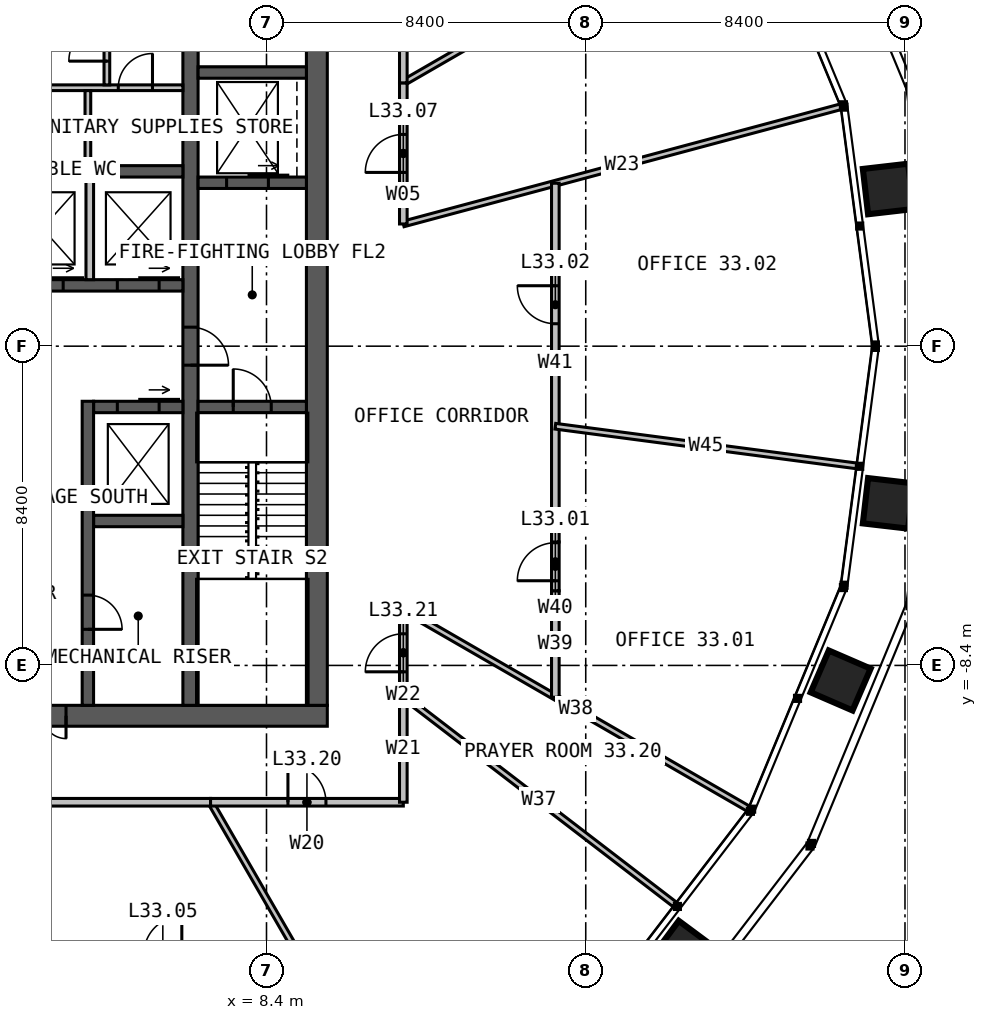
"""IFC4 building model, lengths in metres.
Left out: names, types, materials, properties, quantities, classifications, styles, units other than length and angle.
Written with IfcOpenShell. Run it as: python <this file> out.ifc"""

import sys

from ifc_helpers import new_model, si_unit, direction, frame, frame_2d, origin, place, context, subcontext, project, spatial, rectangle, extrude, element, fill, save


model = new_model("IFC4")
c1 = context("Model", 3, precision=1e-05, world=origin(), true_north=direction((0.0, 1.0)))
c2 = subcontext(c1, "Body", "Model", "MODEL_VIEW")
j1 = project(units=[si_unit("LENGTHUNIT", "METRE"), si_unit("PLANEANGLEUNIT", "RADIAN")], contexts=[c1])
p1 = place(None, origin())
s1 = spatial("IfcSite", under=j1, at=p1, CompositionType="ELEMENT")
p2 = place(p1, origin())
s2 = spatial("IfcBuilding", under=s1, at=p2, CompositionType="ELEMENT")
p3 = place(p2, frame((0.0, 0.0, 138.0)))
s3 = spatial("IfcBuildingStorey", under=s2, at=p3, CompositionType="ELEMENT", Elevation=138.0)
p4 = place(p3, frame((10.0, -9.725, 0.0), z_axis=(0.0, 0.0, 1.0), x_axis=(-1.0, 0.0, 0.0)))
e1 = element("IfcWall", 1, at=p4, inside=s3, PredefinedType="SOLIDWALL", context=c2, shape_type="SweptSolid", body=[
    extrude(rectangle(XDim=20.0, YDim=0.55, at=frame_2d((10.0, 0.0))), origin(), (0.0, 0.0, 1.0), 4.0),
])
p5 = place(p4, frame((6.875, 0.0, 0.0)))
e2 = element("IfcOpeningElement", 2, at=p5, cuts=e1, PredefinedType="OPENING", context=c2, shape_type="SweptSolid", body=[
    extrude(rectangle(XDim=1.2, YDim=2.2, at=frame_2d((0.6, 1.1))), frame((0.0, 0.285, 0.0), z_axis=(0.0, -1.0, 0.0), x_axis=(1.0, 0.0, 0.0)), (0.0, 0.0, 1.0), 0.57),
])
p6 = place(p3, frame((9.725, -9.45, 0.0), z_axis=(0.0, 0.0, 1.0), x_axis=(0.0, 1.0, 0.0)))
e3 = element("IfcWall", 3, at=p6, inside=s3, PredefinedType="SOLIDWALL", context=c2, shape_type="SweptSolid", body=[
    extrude(rectangle(XDim=18.9, YDim=0.55, at=frame_2d((9.45, 0.0))), origin(), (0.0, 0.0, 1.0), 4.0),
])
p7 = place(p3, frame((6.4, 9.45, 0.0), z_axis=(0.0, 0.0, 1.0), x_axis=(0.0, -1.0, 0.0)))
e4 = element("IfcWall", 4, at=p7, inside=s3, PredefinedType="SOLIDWALL", context=c2, shape_type="SweptSolid", body=[
    extrude(rectangle(XDim=18.9, YDim=0.4, at=frame_2d((9.45, 0.0))), origin(), (0.0, 0.0, 1.0), 4.0),
])
p8 = place(p7, frame((8.95, 0.0, 0.0)))
e5 = element("IfcOpeningElement", 5, at=p8, cuts=e4, PredefinedType="OPENING", context=c2, shape_type="SweptSolid", body=[
    extrude(rectangle(XDim=1.0, YDim=2.2, at=frame_2d((0.5, 1.1))), frame((0.0, 0.21, 0.0), z_axis=(0.0, -1.0, 0.0), x_axis=(1.0, 0.0, 0.0)), (0.0, 0.0, 1.0), 0.42),
])
p9 = place(p3, frame((1.35, 1.6, 0.0), z_axis=(0.0, 0.0, 1.0), x_axis=(1.0, 0.0, 0.0)))
e6 = element("IfcWall", 6, at=p9, inside=s3, PredefinedType="SOLIDWALL", context=c2, shape_type="SweptSolid", body=[
    extrude(rectangle(XDim=4.85, YDim=0.3, at=frame_2d((2.425, 0.0))), origin(), (0.0, 0.0, 1.0), 4.0),
])
p10 = place(p9, frame((0.6, 0.0, 0.0)))
e7 = element("IfcOpeningElement", 7, at=p10, cuts=e6, PredefinedType="OPENING", context=c2, shape_type="SweptSolid", body=[
    extrude(rectangle(XDim=1.1, YDim=2.2, at=frame_2d((0.55, 1.1))), frame((0.0, 0.16, 0.0), z_axis=(0.0, -1.0, 0.0), x_axis=(1.0, 0.0, 0.0)), (0.0, 0.0, 1.0), 0.32),
])
p11 = place(p9, frame((3.125, 0.0, 0.0)))
e8 = element("IfcOpeningElement", 8, at=p11, cuts=e6, PredefinedType="OPENING", context=c2, shape_type="SweptSolid", body=[
    extrude(rectangle(XDim=1.1, YDim=2.2, at=frame_2d((0.55, 1.1))), frame((0.0, 0.16, 0.0), z_axis=(0.0, -1.0, 0.0), x_axis=(1.0, 0.0, 0.0)), (0.0, 0.0, 1.0), 0.32),
])
p12 = place(p3, frame((1.35, 4.6, 0.0), z_axis=(0.0, 0.0, 1.0), x_axis=(1.0, 0.0, 0.0)))
e9 = element("IfcWall", 9, at=p12, inside=s3, PredefinedType="SOLIDWALL", context=c2, shape_type="SweptSolid", body=[
    extrude(rectangle(XDim=4.85, YDim=0.3, at=frame_2d((2.425, 0.0))), origin(), (0.0, 0.0, 1.0), 4.0),
])
p13 = place(p3, frame((3.85, -1.6, 0.0), z_axis=(0.0, 0.0, 1.0), x_axis=(1.0, 0.0, 0.0)))
e10 = element("IfcWall", 10, at=p13, inside=s3, PredefinedType="SOLIDWALL", context=c2, shape_type="SweptSolid", body=[
    extrude(rectangle(XDim=2.35, YDim=0.3, at=frame_2d((1.175, 0.0))), origin(), (0.0, 0.0, 1.0), 4.0),
])
p14 = place(p13, frame((0.625, 0.0, 0.0)))
e11 = element("IfcOpeningElement", 11, at=p14, cuts=e10, PredefinedType="OPENING", context=c2, shape_type="SweptSolid", body=[
    extrude(rectangle(XDim=1.1, YDim=2.2, at=frame_2d((0.55, 1.1))), frame((0.0, 0.16, 0.0), z_axis=(0.0, -1.0, 0.0), x_axis=(1.0, 0.0, 0.0)), (0.0, 0.0, 1.0), 0.32),
])
p15 = place(p3, frame((3.85, -4.6, 0.0), z_axis=(0.0, 0.0, 1.0), x_axis=(1.0, 0.0, 0.0)))
e12 = element("IfcWall", 12, at=p15, inside=s3, PredefinedType="SOLIDWALL", context=c2, shape_type="SweptSolid", body=[
    extrude(rectangle(XDim=2.35, YDim=0.3, at=frame_2d((1.175, 0.0))), origin(), (0.0, 0.0, 1.0), 4.0),
])
p16 = place(p3, frame((3.7, -1.45, 0.0), z_axis=(0.0, 0.0, 1.0), x_axis=(0.0, -1.0, 0.0)))
e13 = element("IfcWall", 13, at=p16, inside=s3, PredefinedType="SOLIDWALL", context=c2, shape_type="SweptSolid", body=[
    extrude(rectangle(XDim=8.0, YDim=0.3, at=frame_2d((4.0, 0.0))), origin(), (0.0, 0.0, 1.0), 4.0),
])
p17 = place(p16, frame((5.1, 0.0, 0.0)))
e14 = element("IfcOpeningElement", 14, at=p17, cuts=e13, PredefinedType="OPENING", context=c2, shape_type="SweptSolid", body=[
    extrude(rectangle(XDim=0.9, YDim=2.2, at=frame_2d((0.45, 1.1))), frame((0.0, 0.16, 0.0), z_axis=(0.0, -1.0, 0.0), x_axis=(1.0, 0.0, 0.0)), (0.0, 0.0, 1.0), 0.32),
])
p18 = place(p3, frame((6.6, -1.6, 0.0), z_axis=(0.0, 0.0, 1.0), x_axis=(1.0, 0.0, 0.0)))
e15 = element("IfcWall", 15, at=p18, inside=s3, PredefinedType="SOLIDWALL", context=c2, shape_type="SweptSolid", body=[
    extrude(rectangle(XDim=2.85, YDim=0.3, at=frame_2d((1.425, 0.0))), origin(), (0.0, 0.0, 1.0), 4.0),
])
p19 = place(p18, frame((0.925, 0.0, 0.0)))
e16 = element("IfcOpeningElement", 16, at=p19, cuts=e15, PredefinedType="OPENING", context=c2, shape_type="SweptSolid", body=[
    extrude(rectangle(XDim=1.0, YDim=2.2, at=frame_2d((0.5, 1.1))), frame((0.0, 0.16, 0.0), z_axis=(0.0, -1.0, 0.0), x_axis=(1.0, 0.0, 0.0)), (0.0, 0.0, 1.0), 0.32),
])
p20 = place(p3, frame((6.6, 4.3, 0.0), z_axis=(0.0, 0.0, 1.0), x_axis=(1.0, 0.0, 0.0)))
e17 = element("IfcWall", 17, at=p20, inside=s3, PredefinedType="SOLIDWALL", context=c2, shape_type="SweptSolid", body=[
    extrude(rectangle(XDim=2.85, YDim=0.3, at=frame_2d((1.425, 0.0))), origin(), (0.0, 0.0, 1.0), 4.0),
])
p21 = place(p20, frame((0.75, 0.0, 0.0)))
e18 = element("IfcOpeningElement", 18, at=p21, cuts=e17, PredefinedType="OPENING", context=c2, shape_type="SweptSolid", body=[
    extrude(rectangle(XDim=1.1, YDim=2.2, at=frame_2d((0.55, 1.1))), frame((0.0, 0.16, 0.0), z_axis=(0.0, -1.0, 0.0), x_axis=(1.0, 0.0, 0.0)), (0.0, 0.0, 1.0), 0.32),
])
p22 = place(p3, frame((6.6, 7.2, 0.0), z_axis=(0.0, 0.0, 1.0), x_axis=(1.0, 0.0, 0.0)))
e19 = element("IfcWall", 19, at=p22, inside=s3, PredefinedType="SOLIDWALL", context=c2, shape_type="SweptSolid", body=[
    extrude(rectangle(XDim=2.85, YDim=0.3, at=frame_2d((1.425, 0.0))), origin(), (0.0, 0.0, 1.0), 4.0),
])
p23 = place(p3, frame((3.75, 1.75, 0.0), z_axis=(0.0, 0.0, 1.0), x_axis=(0.0, 1.0, 0.0)))
e20 = element("IfcWall", 20, at=p23, inside=s3, PredefinedType="SOLIDWALL", context=c2, shape_type="SweptSolid", body=[
    extrude(rectangle(XDim=2.7, YDim=0.2, at=frame_2d((1.35, 0.0))), origin(), (0.0, 0.0, 1.0), 3.75),
])
p24 = place(p3, frame((1.35, 6.8, 0.0), z_axis=(0.0, 0.0, 1.0), x_axis=(1.0, 0.0, 0.0)))
e21 = element("IfcWall", 21, at=p24, inside=s3, PredefinedType="PARTITIONING", context=c2, shape_type="SweptSolid", body=[
    extrude(rectangle(XDim=4.85, YDim=0.15, at=frame_2d((2.425, 0.0))), origin(), (0.0, 0.0, 1.0), 3.75),
])
p25 = place(p24, frame((3.15, 0.0, 0.0)))
e22 = element("IfcOpeningElement", 22, at=p25, cuts=e21, PredefinedType="OPENING", context=c2, shape_type="SweptSolid", body=[
    extrude(rectangle(XDim=0.9, YDim=2.2, at=frame_2d((0.45, 1.1))), frame((0.0, 0.085, 0.0), z_axis=(0.0, -1.0, 0.0), x_axis=(1.0, 0.0, 0.0)), (0.0, 0.0, 1.0), 0.17),
])
p26 = place(p3, frame((3.7, 4.75, 0.0), z_axis=(0.0, 0.0, 1.0), x_axis=(0.0, 1.0, 0.0)))
e23 = element("IfcWall", 23, at=p26, inside=s3, PredefinedType="PARTITIONING", context=c2, shape_type="SweptSolid", body=[
    extrude(rectangle(XDim=1.975, YDim=0.15, at=frame_2d((0.988, 0.0))), origin(), (0.0, 0.0, 1.0), 3.75),
])
p27 = place(p3, frame((4.2, 6.875, 0.0), z_axis=(0.0, 0.0, 1.0), x_axis=(0.0, 1.0, 0.0)))
e24 = element("IfcWall", 24, at=p27, inside=s3, PredefinedType="PARTITIONING", context=c2, shape_type="SweptSolid", body=[
    extrude(rectangle(XDim=2.575, YDim=0.15, at=frame_2d((1.288, 0.0))), origin(), (0.0, 0.0, 1.0), 3.75),
])
p28 = place(p27, frame((0.625, 0.0, 0.0)))
e25 = element("IfcOpeningElement", 25, at=p28, cuts=e24, PredefinedType="OPENING", context=c2, shape_type="SweptSolid", body=[
    extrude(rectangle(XDim=1.0, YDim=2.2, at=frame_2d((0.5, 1.1))), frame((0.0, 0.085, 0.0), z_axis=(0.0, -1.0, 0.0), x_axis=(1.0, 0.0, 0.0)), (0.0, 0.0, 1.0), 0.17),
])
p29 = place(p3, frame((12.0, -6.928, 0.0), z_axis=(0.0, 0.0, 1.0), x_axis=(0.866029212144, -0.49999340367, 0.0)))
e26 = element("IfcWall", 26, at=p29, inside=s3, PredefinedType="PARTITIONING", context=c2, shape_type="SweptSolid", body=[
    extrude(rectangle(XDim=10.478, YDim=0.15, at=frame_2d((5.239, 0.0))), origin(), (0.0, 0.0, 1.0), 2.79),
])
p30 = place(p3, frame((12.0, 3.215, 0.0), z_axis=(0.0, 0.0, 1.0), x_axis=(0.965926367889, 0.258817023816, 0.0)))
e27 = element("IfcWall", 27, at=p30, inside=s3, PredefinedType="PARTITIONING", context=c2, shape_type="SweptSolid", body=[
    extrude(rectangle(XDim=11.911, YDim=0.15, at=frame_2d((5.956, 0.0))), origin(), (0.0, 0.0, 1.0), 2.79),
])
for number, where, z_axis, x_axis in (
    (28, (12.0, 6.928, 0.0), (0.0, 0.0, 1.0), (0.866, 0.5, 0.0)),
    (29, (6.928, -12.0, 0.0), (0.0, 0.0, 1.0), (0.5, -0.866, 0.0)),
):
    element("IfcWall", number, at=place(p3, frame(where, z_axis=z_axis, x_axis=x_axis)), inside=s3, PredefinedType="PARTITIONING", context=c2, shape_type="SweptSolid", body=[
        extrude(rectangle(XDim=10.478, YDim=0.15, at=frame_2d((5.239, 0.0))), origin(), (0.0, 0.0, 1.0), 2.79),
    ])
p31 = place(p3, frame((12.0, -9.208, 0.0), z_axis=(0.0, 0.0, 1.0), x_axis=(0.79335350297, -0.608761217002, 0.0)))
e30 = element("IfcWall", 30, at=p31, inside=s3, PredefinedType="PARTITIONING", context=c2, shape_type="SweptSolid", body=[
    extrude(rectangle(XDim=9.0, YDim=0.15, at=frame_2d((4.5, 0.0))), origin(), (0.0, 0.0, 1.0), 2.79),
])
p32 = place(p3, frame((16.0, -9.238, 0.0), z_axis=(0.0, 0.0, 1.0), x_axis=(0.0, 1.0, 0.0)))
e31 = element("IfcWall", 31, at=p32, inside=s3, PredefinedType="PARTITIONING", context=c2, shape_type="SweptSolid", body=[
    extrude(rectangle(XDim=2.802, YDim=0.2, at=frame_2d((1.401, 0.0))), origin(), (0.0, 0.0, 1.0), 3.8),
])
p33 = place(p3, frame((16.0, -6.436, 0.0), z_axis=(0.0, 0.0, 1.0), x_axis=(0.0, 1.0, 0.0)))
e32 = element("IfcWall", 32, at=p33, inside=s3, PredefinedType="PARTITIONING", context=c2, shape_type="SweptSolid", body=[
    extrude(rectangle(XDim=1.284, YDim=0.2, at=frame_2d((0.642, 0.0))), origin(), (0.0, 0.0, 1.0), 3.4),
])
p34 = place(p33, frame((0.264, 0.0, 0.0)))
e33 = element("IfcOpeningElement", 33, at=p34, cuts=e32, PredefinedType="OPENING", context=c2, shape_type="SweptSolid", body=[
    extrude(rectangle(XDim=1.0, YDim=2.2, at=frame_2d((0.5, 1.1))), frame((0.0, 0.11, 0.0), z_axis=(0.0, -1.0, 0.0), x_axis=(1.0, 0.0, 0.0)), (0.0, 0.0, 1.0), 0.22),
])
p35 = place(p3, frame((16.0, -5.152, 0.0), z_axis=(0.0, 0.0, 1.0), x_axis=(0.0, 1.0, 0.0)))
e34 = element("IfcWall", 34, at=p35, inside=s3, PredefinedType="PARTITIONING", context=c2, shape_type="SweptSolid", body=[
    extrude(rectangle(XDim=9.439, YDim=0.2, at=frame_2d((4.72, 0.0))), origin(), (0.0, 0.0, 1.0), 3.8),
])
p36 = place(p35, frame((5.742, 0.0, 0.0)))
e35 = element("IfcOpeningElement", 35, at=p36, cuts=e34, PredefinedType="OPENING", context=c2, shape_type="SweptSolid", body=[
    extrude(rectangle(XDim=1.0, YDim=2.2, at=frame_2d((0.5, 1.1))), frame((0.0, 0.11, 0.0), z_axis=(0.0, -1.0, 0.0), x_axis=(1.0, 0.0, 0.0)), (0.0, 0.0, 1.0), 0.22),
])
p37 = place(p3, frame((16.0, -2.106, 0.0), z_axis=(0.0, 0.0, 1.0), x_axis=(0.991443577351, -0.13053594497, 0.0)))
e36 = element("IfcWall", 36, at=p37, inside=s3, PredefinedType="PARTITIONING", context=c2, shape_type="SweptSolid", body=[
    extrude(rectangle(XDim=7.988, YDim=0.15, at=frame_2d((3.994, 0.0))), origin(), (0.0, 0.0, 1.0), 2.79),
])
p38 = place(p3, frame((12.0, 3.215, 0.0), z_axis=(0.0, 0.0, 1.0), x_axis=(0.0, 1.0, 0.0)))
e37 = element("IfcWall", 37, at=p38, inside=s3, PredefinedType="PARTITIONING", context=c2, shape_type="SweptSolid", body=[
    extrude(rectangle(XDim=3.713, YDim=0.2, at=frame_2d((1.856, 0.0))), origin(), (0.0, 0.0, 1.0), 3.8),
])
p39 = place(p38, frame((1.356, 0.0, 0.0)))
e38 = element("IfcOpeningElement", 38, at=p39, cuts=e37, PredefinedType="OPENING", context=c2, shape_type="SweptSolid", body=[
    extrude(rectangle(XDim=1.0, YDim=2.2, at=frame_2d((0.5, 1.1))), frame((0.0, 0.11, 0.0), z_axis=(0.0, -1.0, 0.0), x_axis=(1.0, 0.0, 0.0)), (0.0, 0.0, 1.0), 0.22),
])
p40 = place(p3, frame((12.0, 6.928, 0.0), z_axis=(0.0, 0.0, 1.0), x_axis=(0.0, 1.0, 0.0)))
e39 = element("IfcWall", 39, at=p40, inside=s3, PredefinedType="PARTITIONING", context=c2, shape_type="SweptSolid", body=[
    extrude(rectangle(XDim=5.072, YDim=0.2, at=frame_2d((2.536, 0.0))), origin(), (0.0, 0.0, 1.0), 3.8),
])
p41 = place(p40, frame((2.036, 0.0, 0.0)))
e40 = element("IfcOpeningElement", 40, at=p41, cuts=e39, PredefinedType="OPENING", context=c2, shape_type="SweptSolid", body=[
    extrude(rectangle(XDim=1.0, YDim=2.2, at=frame_2d((0.5, 1.1))), frame((0.0, 0.11, 0.0), z_axis=(0.0, -1.0, 0.0), x_axis=(1.0, 0.0, 0.0)), (0.0, 0.0, 1.0), 0.22),
])
p42 = place(p3, frame((-6.928, -12.0, 0.0), z_axis=(0.0, 0.0, 1.0), x_axis=(1.0, 0.0, 0.0)))
e41 = element("IfcWall", 41, at=p42, inside=s3, PredefinedType="PARTITIONING", context=c2, shape_type="SweptSolid", body=[
    extrude(rectangle(XDim=13.856, YDim=0.2, at=frame_2d((6.928, 0.0))), origin(), (0.0, 0.0, 1.0), 3.8),
])
p43 = place(p42, frame((6.028, 0.0, 0.0)))
e42 = element("IfcOpeningElement", 42, at=p43, cuts=e41, PredefinedType="OPENING", context=c2, shape_type="SweptSolid", body=[
    extrude(rectangle(XDim=1.8, YDim=2.2, at=frame_2d((0.9, 1.1))), frame((0.0, 0.11, 0.0), z_axis=(0.0, -1.0, 0.0), x_axis=(1.0, 0.0, 0.0)), (0.0, 0.0, 1.0), 0.22),
])
p44 = place(p3, frame((6.928, -12.0, 0.0), z_axis=(0.0, 0.0, 1.0), x_axis=(1.0, 0.0, 0.0)))
e43 = element("IfcWall", 43, at=p44, inside=s3, PredefinedType="PARTITIONING", context=c2, shape_type="SweptSolid", body=[
    extrude(rectangle(XDim=5.072, YDim=0.2, at=frame_2d((2.536, 0.0))), origin(), (0.0, 0.0, 1.0), 3.8),
])
p45 = place(p44, frame((2.036, 0.0, 0.0)))
e44 = element("IfcOpeningElement", 44, at=p45, cuts=e43, PredefinedType="OPENING", context=c2, shape_type="SweptSolid", body=[
    extrude(rectangle(XDim=1.0, YDim=2.2, at=frame_2d((0.5, 1.1))), frame((0.0, 0.11, 0.0), z_axis=(0.0, -1.0, 0.0), x_axis=(1.0, 0.0, 0.0)), (0.0, 0.0, 1.0), 0.22),
])
p46 = place(p3, frame((12.0, -12.0, 0.0), z_axis=(0.0, 0.0, 1.0), x_axis=(0.0, 1.0, 0.0)))
e45 = element("IfcWall", 45, at=p46, inside=s3, PredefinedType="PARTITIONING", context=c2, shape_type="SweptSolid", body=[
    extrude(rectangle(XDim=2.792, YDim=0.2, at=frame_2d((1.396, 0.0))), origin(), (0.0, 0.0, 1.0), 3.8),
])
p47 = place(p3, frame((12.0, -9.208, 0.0), z_axis=(0.0, 0.0, 1.0), x_axis=(0.0, 1.0, 0.0)))
e46 = element("IfcWall", 46, at=p47, inside=s3, PredefinedType="PARTITIONING", context=c2, shape_type="SweptSolid", body=[
    extrude(rectangle(XDim=2.28, YDim=0.2, at=frame_2d((1.14, 0.0))), origin(), (0.0, 0.0, 1.0), 3.8),
])
p48 = place(p47, frame((0.64, 0.0, 0.0)))
e47 = element("IfcOpeningElement", 47, at=p48, cuts=e46, PredefinedType="OPENING", context=c2, shape_type="SweptSolid", body=[
    extrude(rectangle(XDim=1.0, YDim=2.2, at=frame_2d((0.5, 1.1))), frame((0.0, 0.11, 0.0), z_axis=(0.0, -1.0, 0.0), x_axis=(1.0, 0.0, 0.0)), (0.0, 0.0, 1.0), 0.22),
])
p49 = place(p5, origin())
e48 = element("IfcDoor", 48, at=p49, inside=s3, OperationType="DOUBLE_DOOR_SINGLE_SWING", PredefinedType="DOOR", context=c2, shape_type="SweptSolid", body=[
    extrude(rectangle(XDim=1.2, YDim=2.2, at=frame_2d((0.6, 1.1))), frame((0.0, 0.025, 0.0), z_axis=(0.0, -1.0, 0.0), x_axis=(1.0, 0.0, 0.0)), (0.0, 0.0, 1.0), 0.05),
])
fill(e2, e48)
p50 = place(p8, origin())
e49 = element("IfcDoor", 49, at=p50, inside=s3, OperationType="SINGLE_SWING_RIGHT", PredefinedType="DOOR", context=c2, shape_type="SweptSolid", body=[
    extrude(rectangle(XDim=1.0, YDim=2.2, at=frame_2d((0.5, 1.1))), frame((0.0, 0.025, 0.0), z_axis=(0.0, -1.0, 0.0), x_axis=(1.0, 0.0, 0.0)), (0.0, 0.0, 1.0), 0.05),
])
fill(e5, e49)
p51 = place(p19, origin())
e50 = element("IfcDoor", 50, at=p51, inside=s3, OperationType="SINGLE_SWING_LEFT", PredefinedType="DOOR", context=c2, shape_type="SweptSolid", body=[
    extrude(rectangle(XDim=1.0, YDim=2.2, at=frame_2d((0.5, 1.1))), frame((0.0, 0.025, 0.0), z_axis=(0.0, -1.0, 0.0), x_axis=(1.0, 0.0, 0.0)), (0.0, 0.0, 1.0), 0.05),
])
fill(e16, e50)
p52 = place(p17, origin())
e51 = element("IfcDoor", 51, at=p52, inside=s3, OperationType="SINGLE_SWING_RIGHT", PredefinedType="DOOR", context=c2, shape_type="SweptSolid", body=[
    extrude(rectangle(XDim=0.9, YDim=2.2, at=frame_2d((0.45, 1.1))), frame((0.0, 0.025, 0.0), z_axis=(0.0, -1.0, 0.0), x_axis=(1.0, 0.0, 0.0)), (0.0, 0.0, 1.0), 0.05),
])
fill(e14, e51)
p53 = place(p25, origin())
e52 = element("IfcDoor", 52, at=p53, inside=s3, OperationType="SINGLE_SWING_RIGHT", PredefinedType="DOOR", context=c2, shape_type="SweptSolid", body=[
    extrude(rectangle(XDim=0.9, YDim=2.2, at=frame_2d((0.45, 1.1))), frame((0.0, 0.025, 0.0), z_axis=(0.0, -1.0, 0.0), x_axis=(1.0, 0.0, 0.0)), (0.0, 0.0, 1.0), 0.05),
])
fill(e22, e52)
p54 = place(p28, origin())
e53 = element("IfcDoor", 53, at=p54, inside=s3, OperationType="SINGLE_SWING_LEFT", PredefinedType="DOOR", context=c2, shape_type="SweptSolid", body=[
    extrude(rectangle(XDim=1.0, YDim=2.2, at=frame_2d((0.5, 1.1))), frame((0.0, 0.025, 0.0), z_axis=(0.0, -1.0, 0.0), x_axis=(1.0, 0.0, 0.0)), (0.0, 0.0, 1.0), 0.05),
])
fill(e25, e53)
p55 = place(p10, origin())
e54 = element("IfcDoor", 54, at=p55, inside=s3, OperationType="SLIDING_TO_LEFT", PredefinedType="DOOR", context=c2, shape_type="SweptSolid", body=[
    extrude(rectangle(XDim=1.1, YDim=2.2, at=frame_2d((0.55, 1.1))), frame((0.0, 0.025, 0.0), z_axis=(0.0, -1.0, 0.0), x_axis=(1.0, 0.0, 0.0)), (0.0, 0.0, 1.0), 0.05),
])
fill(e7, e54)
p56 = place(p11, origin())
e55 = element("IfcDoor", 55, at=p56, inside=s3, OperationType="SLIDING_TO_LEFT", PredefinedType="DOOR", context=c2, shape_type="SweptSolid", body=[
    extrude(rectangle(XDim=1.1, YDim=2.2, at=frame_2d((0.55, 1.1))), frame((0.0, 0.025, 0.0), z_axis=(0.0, -1.0, 0.0), x_axis=(1.0, 0.0, 0.0)), (0.0, 0.0, 1.0), 0.05),
])
fill(e8, e55)
p57 = place(p14, origin())
e56 = element("IfcDoor", 56, at=p57, inside=s3, OperationType="SLIDING_TO_LEFT", PredefinedType="DOOR", context=c2, shape_type="SweptSolid", body=[
    extrude(rectangle(XDim=1.1, YDim=2.2, at=frame_2d((0.55, 1.1))), frame((0.0, 0.025, 0.0), z_axis=(0.0, -1.0, 0.0), x_axis=(1.0, 0.0, 0.0)), (0.0, 0.0, 1.0), 0.05),
])
fill(e11, e56)
p58 = place(p21, origin())
e57 = element("IfcDoor", 57, at=p58, inside=s3, OperationType="SLIDING_TO_LEFT", PredefinedType="DOOR", context=c2, shape_type="SweptSolid", body=[
    extrude(rectangle(XDim=1.1, YDim=2.2, at=frame_2d((0.55, 1.1))), frame((0.0, 0.025, 0.0), z_axis=(0.0, -1.0, 0.0), x_axis=(1.0, 0.0, 0.0)), (0.0, 0.0, 1.0), 0.05),
])
fill(e18, e57)
p59 = place(p34, origin())
e58 = element("IfcDoor", 58, at=p59, inside=s3, OperationType="SINGLE_SWING_LEFT", PredefinedType="DOOR", context=c2, shape_type="SweptSolid", body=[
    extrude(rectangle(XDim=1.0, YDim=2.2, at=frame_2d((0.5, 1.1))), frame((0.0, 0.025, 0.0), z_axis=(0.0, -1.0, 0.0), x_axis=(1.0, 0.0, 0.0)), (0.0, 0.0, 1.0), 0.05),
])
fill(e33, e58)
p60 = place(p36, origin())
e59 = element("IfcDoor", 59, at=p60, inside=s3, OperationType="SINGLE_SWING_RIGHT", PredefinedType="DOOR", context=c2, shape_type="SweptSolid", body=[
    extrude(rectangle(XDim=1.0, YDim=2.2, at=frame_2d((0.5, 1.1))), frame((0.0, 0.025, 0.0), z_axis=(0.0, -1.0, 0.0), x_axis=(1.0, 0.0, 0.0)), (0.0, 0.0, 1.0), 0.05),
])
fill(e35, e59)
p61 = place(p39, origin())
e60 = element("IfcDoor", 60, at=p61, inside=s3, OperationType="SINGLE_SWING_LEFT", PredefinedType="DOOR", context=c2, shape_type="SweptSolid", body=[
    extrude(rectangle(XDim=1.0, YDim=2.2, at=frame_2d((0.5, 1.1))), frame((0.0, 0.025, 0.0), z_axis=(0.0, -1.0, 0.0), x_axis=(1.0, 0.0, 0.0)), (0.0, 0.0, 1.0), 0.05),
])
fill(e38, e60)
p62 = place(p45, origin())
e61 = element("IfcDoor", 61, at=p62, inside=s3, OperationType="SINGLE_SWING_LEFT", PredefinedType="DOOR", context=c2, shape_type="SweptSolid", body=[
    extrude(rectangle(XDim=1.0, YDim=2.2, at=frame_2d((0.5, 1.1))), frame((0.0, 0.025, 0.0), z_axis=(0.0, -1.0, 0.0), x_axis=(1.0, 0.0, 0.0)), (0.0, 0.0, 1.0), 0.05),
])
fill(e44, e61)
p63 = place(p48, origin())
e62 = element("IfcDoor", 62, at=p63, inside=s3, OperationType="SINGLE_SWING_LEFT", PredefinedType="DOOR", context=c2, shape_type="SweptSolid", body=[
    extrude(rectangle(XDim=1.0, YDim=2.2, at=frame_2d((0.5, 1.1))), frame((0.0, 0.025, 0.0), z_axis=(0.0, -1.0, 0.0), x_axis=(1.0, 0.0, 0.0)), (0.0, 0.0, 1.0), 0.05),
])
fill(e47, e62)
save(model, sys.argv[1])
